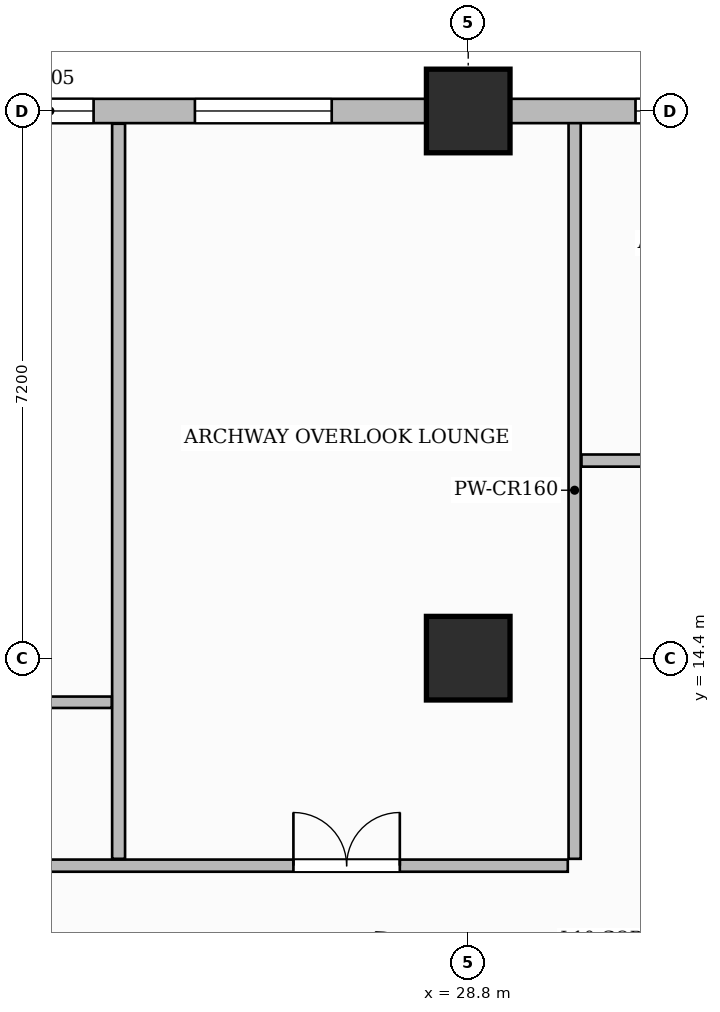
"""IFC4 building model, lengths in metres.
Left out: names, types, materials, properties, quantities, classifications, styles, units other than length and angle.
Written with IfcOpenShell. Run it as: python <this file> out.ifc"""

import sys

from ifc_helpers import new_model, si_unit, direction, frame, frame_2d, origin, origin_2d, place, context, subcontext, project, spatial, rectangle, extrude, source, transform, mapped, element, fill, save


model = new_model("IFC4")
c1 = context("Model", 3, precision=1e-05, world=origin(), true_north=direction((0.0, 1.0)))
c2 = subcontext(c1, "Body", "Model", "MODEL_VIEW")
j1 = project(units=[si_unit("LENGTHUNIT", "METRE"), si_unit("PLANEANGLEUNIT", "RADIAN")], contexts=[c1])
p1 = place(None, origin())
s1 = spatial("IfcSite", under=j1, at=p1, CompositionType="ELEMENT")
p2 = place(p1, origin())
s2 = spatial("IfcBuilding", under=s1, at=p2, CompositionType="ELEMENT")
p3 = place(p2, frame((0.0, 0.0, 47.2)))
s3 = spatial("IfcBuildingStorey", under=s2, at=p3, CompositionType="ELEMENT", Elevation=47.2)
m1 = source(origin(), c2, "Body", "SweptSolid", [
    extrude(rectangle(XDim=1.1, YDim=1.1, at=origin_2d()), origin(), (0.0, 0.0, 1.0), 3.7),
])
for number, where, z_axis, x_axis in (
    (1, (28.8, 14.4, 0.0), (0.0, 0.0, 1.0), (1.0, 0.0, 0.0)),
    (2, (28.8, 21.6, 0.0), (0.0, 0.0, 1.0), (1.0, 0.0, 0.0)),
):
    element("IfcColumn", number, at=place(p3, frame(where, z_axis=z_axis, x_axis=x_axis)), inside=s3, PredefinedType="COLUMN", context=c2, shape_type="MappedRepresentation", body=[
        mapped(m1, transform((0.0, 0.0, 0.0), scale=1.0)),
    ])
p4 = place(p3, frame((14.568, 11.67, 0.0), z_axis=(0.0, 0.0, 1.0), x_axis=(1.0, 0.0, 0.0)))
e3 = element("IfcWall", 3, at=p4, inside=s3, PredefinedType="PARTITIONING", context=c2, shape_type="SweptSolid", body=[
    extrude(rectangle(XDim=15.542, YDim=0.16, at=frame_2d((7.771, 0.0))), origin(), (0.0, 0.0, 1.0), 3.45),
])
p5 = place(p4, frame((3.062, 0.0, 0.0)))
e4 = element("IfcOpeningElement", 4, at=p5, cuts=e3, PredefinedType="OPENING", context=c2, shape_type="SweptSolid", body=[
    extrude(rectangle(XDim=1.05, YDim=2.25, at=frame_2d((0.525, 1.125))), frame((0.0, 0.09, 0.0), z_axis=(0.0, -1.0, 0.0), x_axis=(1.0, 0.0, 0.0)), (0.0, 0.0, 1.0), 0.18),
])
p6 = place(p4, frame((11.932, 0.0, 0.0)))
e5 = element("IfcOpeningElement", 5, at=p6, cuts=e3, PredefinedType="OPENING", context=c2, shape_type="SweptSolid", body=[
    extrude(rectangle(XDim=1.4, YDim=2.35, at=frame_2d((0.7, 1.175))), frame((0.0, 0.09, 0.0), z_axis=(0.0, -1.0, 0.0), x_axis=(1.0, 0.0, 0.0)), (0.0, 0.0, 1.0), 0.18),
])
p7 = place(p3, frame((30.2, 11.76, 0.0), z_axis=(0.0, 0.0, 1.0), x_axis=(0.0, 1.0, 0.0)))
e6 = element("IfcWall", 6, at=p7, inside=s3, PredefinedType="PARTITIONING", context=c2, shape_type="SweptSolid", body=[
    extrude(rectangle(XDim=9.7, YDim=0.16, at=frame_2d((4.85, 0.0))), origin(), (0.0, 0.0, 1.0), 3.45),
])
p8 = place(p3, frame((30.29, 17.0, 0.0), z_axis=(0.0, 0.0, 1.0), x_axis=(1.0, 0.0, 0.0)))
e7 = element("IfcWall", 7, at=p8, inside=s3, PredefinedType="PARTITIONING", context=c2, shape_type="SweptSolid", body=[
    extrude(rectangle(XDim=19.37, YDim=0.16, at=frame_2d((9.685, 0.0))), origin(), (0.0, 0.0, 1.0), 3.45),
])
p9 = place(p8, frame((1.185, 0.0, 0.0)))
e8 = element("IfcOpeningElement", 8, at=p9, cuts=e7, PredefinedType="OPENING", context=c2, shape_type="SweptSolid", body=[
    extrude(rectangle(XDim=0.85, YDim=2.1, at=frame_2d((0.425, 1.05))), frame((0.0, 0.09, 0.0), z_axis=(0.0, -1.0, 0.0), x_axis=(1.0, 0.0, 0.0)), (0.0, 0.0, 1.0), 0.18),
])
p10 = place(p8, frame((6.66, 0.0, 0.0)))
e9 = element("IfcOpeningElement", 9, at=p10, cuts=e7, PredefinedType="OPENING", context=c2, shape_type="SweptSolid", body=[
    extrude(rectangle(XDim=0.9, YDim=2.15, at=frame_2d((0.45, 1.075))), frame((0.0, 0.09, 0.0), z_axis=(0.0, -1.0, 0.0), x_axis=(1.0, 0.0, 0.0)), (0.0, 0.0, 1.0), 0.18),
])
p11 = place(p8, frame((14.46, 0.0, 0.0)))
e10 = element("IfcOpeningElement", 10, at=p11, cuts=e7, PredefinedType="OPENING", context=c2, shape_type="SweptSolid", body=[
    extrude(rectangle(XDim=1.4, YDim=2.35, at=frame_2d((0.7, 1.175))), frame((0.0, 0.09, 0.0), z_axis=(0.0, -1.0, 0.0), x_axis=(1.0, 0.0, 0.0)), (0.0, 0.0, 1.0), 0.18),
])
p12 = place(p3, frame((24.2, 11.76, 0.0), z_axis=(0.0, 0.0, 1.0), x_axis=(0.0, 1.0, 0.0)))
e11 = element("IfcWall", 11, at=p12, inside=s3, PredefinedType="PARTITIONING", context=c2, shape_type="SweptSolid", body=[
    extrude(rectangle(XDim=9.672, YDim=0.17, at=frame_2d((4.836, 0.0))), origin(), (0.0, 0.0, 1.0), 3.45),
])
p13 = place(p3, frame((19.57, 13.82, 0.0), z_axis=(0.0, 0.0, 1.0), x_axis=(1.0, 0.0, 0.0)))
e12 = element("IfcWall", 12, at=p13, inside=s3, PredefinedType="PARTITIONING", context=c2, shape_type="SweptSolid", body=[
    extrude(rectangle(XDim=4.54, YDim=0.15, at=frame_2d((2.27, 0.0))), origin(), (0.0, 0.0, 1.0), 3.45),
])
p14 = place(p13, frame((2.788, 0.0, 0.0)))
e13 = element("IfcOpeningElement", 13, at=p14, cuts=e12, PredefinedType="OPENING", context=c2, shape_type="SweptSolid", body=[
    extrude(rectangle(XDim=0.9, YDim=2.15, at=frame_2d((0.45, 1.075))), frame((0.0, 0.085, 0.0), z_axis=(0.0, -1.0, 0.0), x_axis=(1.0, 0.0, 0.0)), (0.0, 0.0, 1.0), 0.17),
])
p15 = place(p3, frame((14.4, 21.6, 0.0), z_axis=(0.0, 0.0, 1.0), x_axis=(1.0, 0.0, 0.0)))
e14 = element("IfcWall", 14, at=p15, inside=s3, PredefinedType="SOLIDWALL", context=c2, shape_type="SweptSolid", body=[
    extrude(rectangle(XDim=43.2, YDim=0.32, at=frame_2d((21.6, 0.0))), origin(), (0.0, 0.0, 1.0), 2.885),
])
p16 = place(p15, frame((1.5, 0.0, 0.0)))
e15 = element("IfcOpeningElement", 15, at=p16, cuts=e14, PredefinedType="OPENING", context=c2, shape_type="SweptSolid", body=[
    extrude(rectangle(XDim=1.2, YDim=2.2, at=frame_2d((0.6, 1.1))), frame((0.0, 0.17, 0.0), z_axis=(0.0, -1.0, 0.0), x_axis=(1.0, 0.0, 0.0)), (0.0, 0.0, 1.0), 0.34),
])
p17 = place(p15, frame((3.336, 0.0, 0.8)))
e16 = element("IfcOpeningElement", 16, at=p17, cuts=e14, PredefinedType="OPENING", context=c2, shape_type="SweptSolid", body=[
    extrude(rectangle(XDim=1.4, YDim=1.85, at=frame_2d((0.7, 0.925))), frame((0.0, 0.17, 0.0), z_axis=(0.0, -1.0, 0.0), x_axis=(1.0, 0.0, 0.0)), (0.0, 0.0, 1.0), 0.34),
])
p18 = place(p15, frame((5.269, 0.0, 0.8)))
e17 = element("IfcOpeningElement", 17, at=p18, cuts=e14, PredefinedType="OPENING", context=c2, shape_type="SweptSolid", body=[
    extrude(rectangle(XDim=0.95, YDim=1.75, at=frame_2d((0.475, 0.875))), frame((0.0, 0.17, 0.0), z_axis=(0.0, -1.0, 0.0), x_axis=(1.0, 0.0, 0.0)), (0.0, 0.0, 1.0), 0.34),
])
p19 = place(p15, frame((8.321, 0.0, 0.8)))
e18 = element("IfcOpeningElement", 18, at=p19, cuts=e14, PredefinedType="OPENING", context=c2, shape_type="SweptSolid", body=[
    extrude(rectangle(XDim=1.15, YDim=1.8, at=frame_2d((0.575, 0.9))), frame((0.0, 0.17, 0.0), z_axis=(0.0, -1.0, 0.0), x_axis=(1.0, 0.0, 0.0)), (0.0, 0.0, 1.0), 0.34),
])
p20 = place(p15, frame((10.804, 0.0, 0.8)))
e19 = element("IfcOpeningElement", 19, at=p20, cuts=e14, PredefinedType="OPENING", context=c2, shape_type="SweptSolid", body=[
    extrude(rectangle(XDim=1.8, YDim=1.85, at=frame_2d((0.9, 0.925))), frame((0.0, 0.17, 0.0), z_axis=(0.0, -1.0, 0.0), x_axis=(1.0, 0.0, 0.0)), (0.0, 0.0, 1.0), 0.34),
])
p21 = place(p15, frame((16.601, 0.0, 0.8)))
e20 = element("IfcOpeningElement", 20, at=p21, cuts=e14, PredefinedType="OPENING", context=c2, shape_type="SweptSolid", body=[
    extrude(rectangle(XDim=1.8, YDim=1.85, at=frame_2d((0.9, 0.925))), frame((0.0, 0.17, 0.0), z_axis=(0.0, -1.0, 0.0), x_axis=(1.0, 0.0, 0.0)), (0.0, 0.0, 1.0), 0.34),
])
p22 = place(p15, frame((21.723, 0.0, 0.8)))
e21 = element("IfcOpeningElement", 21, at=p22, cuts=e14, PredefinedType="OPENING", context=c2, shape_type="SweptSolid", body=[
    extrude(rectangle(XDim=1.8, YDim=1.85, at=frame_2d((0.9, 0.925))), frame((0.0, 0.17, 0.0), z_axis=(0.0, -1.0, 0.0), x_axis=(1.0, 0.0, 0.0)), (0.0, 0.0, 1.0), 0.34),
])
p23 = place(p15, frame((24.469, 0.0, 0.8)))
e22 = element("IfcOpeningElement", 22, at=p23, cuts=e14, PredefinedType="OPENING", context=c2, shape_type="SweptSolid", body=[
    extrude(rectangle(XDim=1.8, YDim=1.85, at=frame_2d((0.9, 0.925))), frame((0.0, 0.17, 0.0), z_axis=(0.0, -1.0, 0.0), x_axis=(1.0, 0.0, 0.0)), (0.0, 0.0, 1.0), 0.34),
])
p24 = place(p15, frame((29.075, 0.0, 0.8)))
e23 = element("IfcOpeningElement", 23, at=p24, cuts=e14, PredefinedType="OPENING", context=c2, shape_type="SweptSolid", body=[
    extrude(rectangle(XDim=1.8, YDim=1.85, at=frame_2d((0.9, 0.925))), frame((0.0, 0.17, 0.0), z_axis=(0.0, -1.0, 0.0), x_axis=(1.0, 0.0, 0.0)), (0.0, 0.0, 1.0), 0.34),
])
p25 = place(p15, frame((32.125, 0.0, 0.8)))
e24 = element("IfcOpeningElement", 24, at=p25, cuts=e14, PredefinedType="OPENING", context=c2, shape_type="SweptSolid", body=[
    extrude(rectangle(XDim=1.8, YDim=1.85, at=frame_2d((0.9, 0.925))), frame((0.0, 0.17, 0.0), z_axis=(0.0, -1.0, 0.0), x_axis=(1.0, 0.0, 0.0)), (0.0, 0.0, 1.0), 0.34),
])
p26 = place(p15, frame((36.875, 0.0, 0.8)))
e25 = element("IfcOpeningElement", 25, at=p26, cuts=e14, PredefinedType="OPENING", context=c2, shape_type="SweptSolid", body=[
    extrude(rectangle(XDim=1.8, YDim=1.85, at=frame_2d((0.9, 0.925))), frame((0.0, 0.17, 0.0), z_axis=(0.0, -1.0, 0.0), x_axis=(1.0, 0.0, 0.0)), (0.0, 0.0, 1.0), 0.34),
])
p27 = place(p15, frame((39.925, 0.0, 0.8)))
e26 = element("IfcOpeningElement", 26, at=p27, cuts=e14, PredefinedType="OPENING", context=c2, shape_type="SweptSolid", body=[
    extrude(rectangle(XDim=1.8, YDim=1.85, at=frame_2d((0.9, 0.925))), frame((0.0, 0.17, 0.0), z_axis=(0.0, -1.0, 0.0), x_axis=(1.0, 0.0, 0.0)), (0.0, 0.0, 1.0), 0.34),
])
m2 = source(origin(), c2, "Body", "SweptSolid", [
    extrude(rectangle(XDim=1.4, YDim=2.35, at=frame_2d((0.7, 1.175))), frame((0.0, 0.025, 0.0), z_axis=(0.0, -1.0, 0.0), x_axis=(1.0, 0.0, 0.0)), (0.0, 0.0, 1.0), 0.05),
])
p28 = place(p6, origin())
e27 = element("IfcDoor", 27, at=p28, inside=s3, OperationType="DOUBLE_DOOR_SINGLE_SWING", PredefinedType="DOOR", context=c2, shape_type="MappedRepresentation", body=[
    mapped(m2, transform((0.0, 0.0, 0.0), scale=1.0)),
])
fill(e5, e27)
m3 = source(origin(), c2, "Body", "SweptSolid", [
    extrude(rectangle(XDim=1.15, YDim=1.8, at=frame_2d((0.575, 0.9))), frame((0.0, 0.03, 0.0), z_axis=(0.0, -1.0, 0.0), x_axis=(1.0, 0.0, 0.0)), (0.0, 0.0, 1.0), 0.06),
])
p29 = place(p19, origin())
e28 = element("IfcWindow", 28, at=p29, inside=s3, PartitioningType="SINGLE_PANEL", PredefinedType="WINDOW", context=c2, shape_type="MappedRepresentation", body=[
    mapped(m3, transform((0.0, 0.0, 0.0), scale=1.0)),
])
fill(e18, e28)
m4 = source(origin(), c2, "Body", "SweptSolid", [
    extrude(rectangle(XDim=1.8, YDim=1.85, at=frame_2d((0.9, 0.925))), frame((0.0, 0.03, 0.0), z_axis=(0.0, -1.0, 0.0), x_axis=(1.0, 0.0, 0.0)), (0.0, 0.0, 1.0), 0.06),
])
p30 = place(p20, origin())
e29 = element("IfcWindow", 29, at=p30, inside=s3, PartitioningType="DOUBLE_PANEL_VERTICAL", PredefinedType="WINDOW", context=c2, shape_type="MappedRepresentation", body=[
    mapped(m4, transform((0.0, 0.0, 0.0), scale=1.0)),
])
fill(e19, e29)
p31 = place(p21, origin())
e30 = element("IfcWindow", 30, at=p31, inside=s3, PartitioningType="DOUBLE_PANEL_VERTICAL", PredefinedType="WINDOW", context=c2, shape_type="MappedRepresentation", body=[
    mapped(m4, transform((0.0, 0.0, 0.0), scale=1.0)),
])
fill(e20, e30)
save(model, sys.argv[1])
